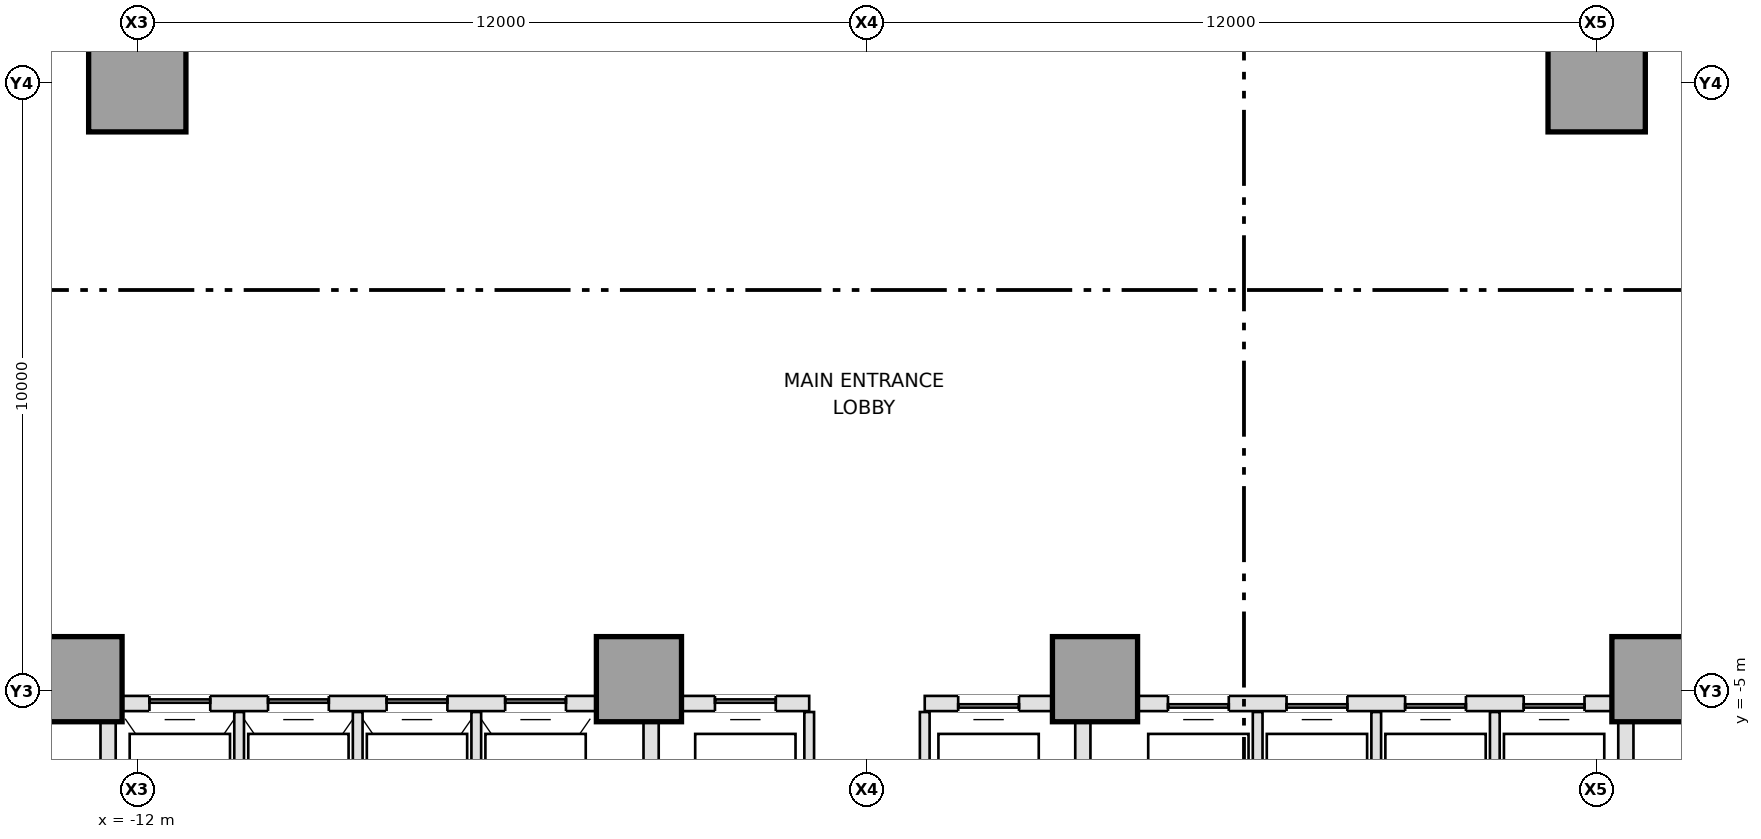
"""IFC4 building model, lengths in metres.
Left out: names, types, materials, properties, quantities, classifications, styles, units other than length and angle.
Written with IfcOpenShell. Run it as: python <this file> out.ifc"""

import sys

from ifc_helpers import new_model, si_unit, direction, frame, frame_2d, origin, origin_2d, place, context, subcontext, project, spatial, rectangle, extrude, element, fill, save


model = new_model("IFC4")
c1 = context("Model", 3, precision=1e-05, world=origin(), true_north=direction((0.0, 1.0)))
c2 = subcontext(c1, "Body", "Model", "MODEL_VIEW")
j1 = project(units=[si_unit("LENGTHUNIT", "METRE"), si_unit("PLANEANGLEUNIT", "RADIAN")], contexts=[c1])
p1 = place(None, origin())
s1 = spatial("IfcSite", under=j1, at=p1, CompositionType="ELEMENT")
p2 = place(p1, origin())
s2 = spatial("IfcBuilding", under=s1, at=p2, CompositionType="ELEMENT")
p3 = place(p2, origin())
s3 = spatial("IfcBuildingStorey", under=s2, at=p3, CompositionType="ELEMENT", Elevation=0.0)
for number, where, z_axis, x_axis in (
    (1, (-12.95, -4.8, 0.0), (0.0, 0.0, 1.0), (1.0, 0.0, 0.0)),
    (2, (-3.75, -4.8, 0.0), (0.0, 0.0, 1.0), (1.0, 0.0, 0.0)),
    (3, (3.75, -4.8, 0.0), (0.0, 0.0, 1.0), (1.0, 0.0, 0.0)),
    (4, (12.95, -4.8, 0.0), (0.0, 0.0, 1.0), (1.0, 0.0, 0.0)),
):
    element("IfcColumn", number, at=place(p3, frame(where, z_axis=z_axis, x_axis=x_axis)), inside=s3, PredefinedType="COLUMN", context=c2, shape_type="SweptSolid", body=[
        extrude(rectangle(XDim=1.4, YDim=1.4, at=origin_2d()), origin(), (0.0, 0.0, 1.0), 5.0),
    ])
for number, where, z_axis, x_axis in (
    (5, (-12.0, 5.0, 0.0), (0.0, 0.0, 1.0), (1.0, 0.0, 0.0)),
    (6, (12.0, 5.0, 0.0), (0.0, 0.0, 1.0), (1.0, 0.0, 0.0)),
):
    element("IfcColumn", number, at=place(p3, frame(where, z_axis=z_axis, x_axis=x_axis)), inside=s3, PredefinedType="COLUMN", context=c2, shape_type="SweptSolid", body=[
        extrude(rectangle(XDim=1.6, YDim=1.6, at=origin_2d()), origin(), (0.0, 0.0, 1.0), 5.0),
    ])
p4 = place(p3, frame((-12.48, -10.18, 0.0), z_axis=(0.0, 0.0, 1.0), x_axis=(0.0, 1.0, 0.0)))
e7 = element("IfcWall", 7, at=p4, inside=s3, PredefinedType="PARTITIONING", context=c2, shape_type="SweptSolid", body=[
    extrude(rectangle(XDim=4.678, YDim=0.25, at=frame_2d((2.339, 0.0))), origin(), (0.0, 0.0, 1.0), 4.7),
])
p5 = place(p4, frame((0.5, 0.0, 0.0)))
e8 = element("IfcOpeningElement", 8, at=p5, cuts=e7, PredefinedType="OPENING", context=c2, shape_type="SweptSolid", body=[
    extrude(rectangle(XDim=1.05, YDim=2.15, at=frame_2d((0.525, 1.075))), frame((0.0, 0.135, 0.0), z_axis=(0.0, -1.0, 0.0), x_axis=(1.0, 0.0, 0.0)), (0.0, 0.0, 1.0), 0.27),
])
p6 = place(p3, frame((12.48, -5.502, 0.0), z_axis=(0.0, 0.0, 1.0), x_axis=(0.0, -1.0, 0.0)))
e9 = element("IfcWall", 9, at=p6, inside=s3, PredefinedType="PARTITIONING", context=c2, shape_type="SweptSolid", body=[
    extrude(rectangle(XDim=4.678, YDim=0.25, at=frame_2d((2.339, 0.0))), origin(), (0.0, 0.0, 1.0), 4.7),
])
p7 = place(p6, frame((3.29, 0.0, 0.0)))
e10 = element("IfcOpeningElement", 10, at=p7, cuts=e9, PredefinedType="OPENING", context=c2, shape_type="SweptSolid", body=[
    extrude(rectangle(XDim=1.05, YDim=2.15, at=frame_2d((0.525, 1.075))), frame((0.0, 0.135, 0.0), z_axis=(0.0, -1.0, 0.0), x_axis=(1.0, 0.0, 0.0)), (0.0, 0.0, 1.0), 0.27),
])
p8 = place(p3, frame((-3.55, -15.648, 0.0), z_axis=(0.0, 0.0, 1.0), x_axis=(0.0, 1.0, 0.0)))
e11 = element("IfcWall", 11, at=p8, inside=s3, PredefinedType="PARTITIONING", context=c2, shape_type="SweptSolid", body=[
    extrude(rectangle(XDim=10.146, YDim=0.25, at=frame_2d((5.073, 0.0))), origin(), (0.0, 0.0, 1.0), 4.7),
])
p9 = place(p8, frame((5.948, 0.0, 0.0)))
e12 = element("IfcOpeningElement", 12, at=p9, cuts=e11, PredefinedType="OPENING", context=c2, shape_type="SweptSolid", body=[
    extrude(rectangle(XDim=1.0, YDim=2.15, at=frame_2d((0.5, 1.075))), frame((0.0, 0.135, 0.0), z_axis=(0.0, -1.0, 0.0), x_axis=(1.0, 0.0, 0.0)), (0.0, 0.0, 1.0), 0.27),
])
p10 = place(p3, frame((3.55, -15.648, 0.0), z_axis=(0.0, 0.0, 1.0), x_axis=(0.0, 1.0, 0.0)))
e13 = element("IfcWall", 13, at=p10, inside=s3, PredefinedType="PARTITIONING", context=c2, shape_type="SweptSolid", body=[
    extrude(rectangle(XDim=10.146, YDim=0.25, at=frame_2d((5.073, 0.0))), origin(), (0.0, 0.0, 1.0), 4.7),
])
p11 = place(p10, frame((5.948, 0.0, 0.0)))
e14 = element("IfcOpeningElement", 14, at=p11, cuts=e13, PredefinedType="OPENING", context=c2, shape_type="SweptSolid", body=[
    extrude(rectangle(XDim=1.0, YDim=2.15, at=frame_2d((0.5, 1.075))), frame((0.0, 0.135, 0.0), z_axis=(0.0, -1.0, 0.0), x_axis=(1.0, 0.0, 0.0)), (0.0, 0.0, 1.0), 0.27),
])
p12 = place(p3, frame((-12.248, -5.2, 0.0), z_axis=(0.0, 0.0, 1.0), x_axis=(1.0, 0.0, 0.0)))
e15 = element("IfcWall", 15, at=p12, inside=s3, PredefinedType="PARTITIONING", context=c2, shape_type="SweptSolid", body=[
    extrude(rectangle(XDim=7.796, YDim=0.25, at=frame_2d((3.898, 0.0))), origin(), (0.0, 0.0, 1.0), 4.7),
])
p13 = place(p12, frame((0.448, 0.0, 0.0)))
e16 = element("IfcOpeningElement", 16, at=p13, cuts=e15, PredefinedType="OPENING", context=c2, shape_type="SweptSolid", body=[
    extrude(rectangle(XDim=1.0, YDim=2.15, at=frame_2d((0.5, 1.075))), frame((0.0, 0.135, 0.0), z_axis=(0.0, -1.0, 0.0), x_axis=(1.0, 0.0, 0.0)), (0.0, 0.0, 1.0), 0.27),
])
p14 = place(p12, frame((2.398, 0.0, 0.0)))
e17 = element("IfcOpeningElement", 17, at=p14, cuts=e15, PredefinedType="OPENING", context=c2, shape_type="SweptSolid", body=[
    extrude(rectangle(XDim=1.0, YDim=2.15, at=frame_2d((0.5, 1.075))), frame((0.0, 0.135, 0.0), z_axis=(0.0, -1.0, 0.0), x_axis=(1.0, 0.0, 0.0)), (0.0, 0.0, 1.0), 0.27),
])
p15 = place(p12, frame((4.348, 0.0, 0.0)))
e18 = element("IfcOpeningElement", 18, at=p15, cuts=e15, PredefinedType="OPENING", context=c2, shape_type="SweptSolid", body=[
    extrude(rectangle(XDim=1.0, YDim=2.15, at=frame_2d((0.5, 1.075))), frame((0.0, 0.135, 0.0), z_axis=(0.0, -1.0, 0.0), x_axis=(1.0, 0.0, 0.0)), (0.0, 0.0, 1.0), 0.27),
])
p16 = place(p12, frame((6.298, 0.0, 0.0)))
e19 = element("IfcOpeningElement", 19, at=p16, cuts=e15, PredefinedType="OPENING", context=c2, shape_type="SweptSolid", body=[
    extrude(rectangle(XDim=1.0, YDim=2.15, at=frame_2d((0.5, 1.075))), frame((0.0, 0.135, 0.0), z_axis=(0.0, -1.0, 0.0), x_axis=(1.0, 0.0, 0.0)), (0.0, 0.0, 1.0), 0.27),
])
p17 = place(p3, frame((4.452, -5.2, 0.0), z_axis=(0.0, 0.0, 1.0), x_axis=(1.0, 0.0, 0.0)))
e20 = element("IfcWall", 20, at=p17, inside=s3, PredefinedType="PARTITIONING", context=c2, shape_type="SweptSolid", body=[
    extrude(rectangle(XDim=7.796, YDim=0.25, at=frame_2d((3.898, 0.0))), origin(), (0.0, 0.0, 1.0), 4.7),
])
p18 = place(p17, frame((0.498, 0.0, 0.0)))
e21 = element("IfcOpeningElement", 21, at=p18, cuts=e20, PredefinedType="OPENING", context=c2, shape_type="SweptSolid", body=[
    extrude(rectangle(XDim=1.0, YDim=2.15, at=frame_2d((0.5, 1.075))), frame((0.0, 0.135, 0.0), z_axis=(0.0, -1.0, 0.0), x_axis=(1.0, 0.0, 0.0)), (0.0, 0.0, 1.0), 0.27),
])
p19 = place(p17, frame((2.448, 0.0, 0.0)))
e22 = element("IfcOpeningElement", 22, at=p19, cuts=e20, PredefinedType="OPENING", context=c2, shape_type="SweptSolid", body=[
    extrude(rectangle(XDim=1.0, YDim=2.15, at=frame_2d((0.5, 1.075))), frame((0.0, 0.135, 0.0), z_axis=(0.0, -1.0, 0.0), x_axis=(1.0, 0.0, 0.0)), (0.0, 0.0, 1.0), 0.27),
])
p20 = place(p17, frame((4.398, 0.0, 0.0)))
e23 = element("IfcOpeningElement", 23, at=p20, cuts=e20, PredefinedType="OPENING", context=c2, shape_type="SweptSolid", body=[
    extrude(rectangle(XDim=1.0, YDim=2.15, at=frame_2d((0.5, 1.075))), frame((0.0, 0.135, 0.0), z_axis=(0.0, -1.0, 0.0), x_axis=(1.0, 0.0, 0.0)), (0.0, 0.0, 1.0), 0.27),
])
p21 = place(p17, frame((6.348, 0.0, 0.0)))
e24 = element("IfcOpeningElement", 24, at=p21, cuts=e20, PredefinedType="OPENING", context=c2, shape_type="SweptSolid", body=[
    extrude(rectangle(XDim=1.0, YDim=2.15, at=frame_2d((0.5, 1.075))), frame((0.0, 0.135, 0.0), z_axis=(0.0, -1.0, 0.0), x_axis=(1.0, 0.0, 0.0)), (0.0, 0.0, 1.0), 0.27),
])
p22 = place(p3, frame((-3.048, -5.2, 0.0), z_axis=(0.0, 0.0, 1.0), x_axis=(1.0, 0.0, 0.0)))
e25 = element("IfcWall", 25, at=p22, inside=s3, PredefinedType="PARTITIONING", context=c2, shape_type="SweptSolid", body=[
    extrude(rectangle(XDim=2.098, YDim=0.25, at=frame_2d((1.049, 0.0))), origin(), (0.0, 0.0, 1.0), 4.7),
])
p23 = place(p22, frame((0.548, 0.0, 0.0)))
e26 = element("IfcOpeningElement", 26, at=p23, cuts=e25, PredefinedType="OPENING", context=c2, shape_type="SweptSolid", body=[
    extrude(rectangle(XDim=1.0, YDim=2.15, at=frame_2d((0.5, 1.075))), frame((0.0, 0.135, 0.0), z_axis=(0.0, -1.0, 0.0), x_axis=(1.0, 0.0, 0.0)), (0.0, 0.0, 1.0), 0.27),
])
p24 = place(p3, frame((0.95, -5.2, 0.0), z_axis=(0.0, 0.0, 1.0), x_axis=(1.0, 0.0, 0.0)))
e27 = element("IfcWall", 27, at=p24, inside=s3, PredefinedType="PARTITIONING", context=c2, shape_type="SweptSolid", body=[
    extrude(rectangle(XDim=2.098, YDim=0.25, at=frame_2d((1.049, 0.0))), origin(), (0.0, 0.0, 1.0), 4.7),
])
p25 = place(p24, frame((0.55, 0.0, 0.0)))
e28 = element("IfcOpeningElement", 28, at=p25, cuts=e27, PredefinedType="OPENING", context=c2, shape_type="SweptSolid", body=[
    extrude(rectangle(XDim=1.0, YDim=2.15, at=frame_2d((0.5, 1.075))), frame((0.0, 0.135, 0.0), z_axis=(0.0, -1.0, 0.0), x_axis=(1.0, 0.0, 0.0)), (0.0, 0.0, 1.0), 0.27),
])
p26 = place(p3, frame((-10.325, -7.993, 0.0), z_axis=(0.0, 0.0, 1.0), x_axis=(0.0, 1.0, 0.0)))
e29 = element("IfcWall", 29, at=p26, inside=s3, PredefinedType="PARTITIONING", context=c2, shape_type="SweptSolid", body=[
    extrude(rectangle(XDim=2.653, YDim=0.16, at=frame_2d((1.326, 0.0))), origin(), (0.0, 0.0, 1.0), 4.7),
])
for number, where, z_axis, x_axis in (
    (30, (-8.375, -8.073, 0.0), (0.0, 0.0, 1.0), (0.0, 1.0, 0.0)),
    (31, (-6.425, -8.073, 0.0), (0.0, 0.0, 1.0), (0.0, 1.0, 0.0)),
    (32, (6.425, -8.073, 0.0), (0.0, 0.0, 1.0), (0.0, 1.0, 0.0)),
    (33, (8.375, -8.073, 0.0), (0.0, 0.0, 1.0), (0.0, 1.0, 0.0)),
):
    element("IfcWall", number, at=place(p3, frame(where, z_axis=z_axis, x_axis=x_axis)), inside=s3, PredefinedType="PARTITIONING", context=c2, shape_type="SweptSolid", body=[
        extrude(rectangle(XDim=2.733, YDim=0.16, at=frame_2d((1.366, 0.0))), origin(), (0.0, 0.0, 1.0), 4.7),
    ])
p27 = place(p3, frame((10.325, -7.993, 0.0), z_axis=(0.0, 0.0, 1.0), x_axis=(0.0, 1.0, 0.0)))
e34 = element("IfcWall", 34, at=p27, inside=s3, PredefinedType="PARTITIONING", context=c2, shape_type="SweptSolid", body=[
    extrude(rectangle(XDim=2.653, YDim=0.16, at=frame_2d((1.326, 0.0))), origin(), (0.0, 0.0, 1.0), 4.7),
])
for number, where, z_axis, x_axis in (
    (35, (-0.95, -8.12, 0.0), (0.0, 0.0, 1.0), (0.0, 1.0, 0.0)),
    (36, (0.95, -8.12, 0.0), (0.0, 0.0, 1.0), (0.0, 1.0, 0.0)),
):
    element("IfcWall", number, at=place(p3, frame(where, z_axis=z_axis, x_axis=x_axis)), inside=s3, PredefinedType="PARTITIONING", context=c2, shape_type="SweptSolid", body=[
        extrude(rectangle(XDim=2.78, YDim=0.16, at=frame_2d((1.39, 0.0))), origin(), (0.0, 0.0, 1.0), 4.7),
    ])
p28 = place(p13, origin())
e37 = element("IfcDoor", 37, at=p28, inside=s3, OperationType="SLIDING_TO_LEFT", PredefinedType="DOOR", context=c2, shape_type="SweptSolid", body=[
    extrude(rectangle(XDim=1.0, YDim=2.15, at=frame_2d((0.5, 1.075))), frame((0.0, 0.025, 0.0), z_axis=(0.0, -1.0, 0.0), x_axis=(1.0, 0.0, 0.0)), (0.0, 0.0, 1.0), 0.05),
])
fill(e16, e37)
p29 = place(p14, origin())
e38 = element("IfcDoor", 38, at=p29, inside=s3, OperationType="SLIDING_TO_LEFT", PredefinedType="DOOR", context=c2, shape_type="SweptSolid", body=[
    extrude(rectangle(XDim=1.0, YDim=2.15, at=frame_2d((0.5, 1.075))), frame((0.0, 0.025, 0.0), z_axis=(0.0, -1.0, 0.0), x_axis=(1.0, 0.0, 0.0)), (0.0, 0.0, 1.0), 0.05),
])
fill(e17, e38)
p30 = place(p15, origin())
e39 = element("IfcDoor", 39, at=p30, inside=s3, OperationType="SLIDING_TO_LEFT", PredefinedType="DOOR", context=c2, shape_type="SweptSolid", body=[
    extrude(rectangle(XDim=1.0, YDim=2.15, at=frame_2d((0.5, 1.075))), frame((0.0, 0.025, 0.0), z_axis=(0.0, -1.0, 0.0), x_axis=(1.0, 0.0, 0.0)), (0.0, 0.0, 1.0), 0.05),
])
fill(e18, e39)
p31 = place(p16, origin())
e40 = element("IfcDoor", 40, at=p31, inside=s3, OperationType="SLIDING_TO_LEFT", PredefinedType="DOOR", context=c2, shape_type="SweptSolid", body=[
    extrude(rectangle(XDim=1.0, YDim=2.15, at=frame_2d((0.5, 1.075))), frame((0.0, 0.025, 0.0), z_axis=(0.0, -1.0, 0.0), x_axis=(1.0, 0.0, 0.0)), (0.0, 0.0, 1.0), 0.05),
])
fill(e19, e40)
p32 = place(p23, origin())
e41 = element("IfcDoor", 41, at=p32, inside=s3, OperationType="SLIDING_TO_LEFT", PredefinedType="DOOR", context=c2, shape_type="SweptSolid", body=[
    extrude(rectangle(XDim=1.0, YDim=2.15, at=frame_2d((0.5, 1.075))), frame((0.0, 0.025, 0.0), z_axis=(0.0, -1.0, 0.0), x_axis=(1.0, 0.0, 0.0)), (0.0, 0.0, 1.0), 0.05),
])
fill(e26, e41)
p33 = place(p25, origin())
e42 = element("IfcDoor", 42, at=p33, inside=s3, OperationType="SLIDING_TO_RIGHT", PredefinedType="DOOR", context=c2, shape_type="SweptSolid", body=[
    extrude(rectangle(XDim=1.0, YDim=2.15, at=frame_2d((0.5, 1.075))), frame((0.0, 0.025, 0.0), z_axis=(0.0, -1.0, 0.0), x_axis=(1.0, 0.0, 0.0)), (0.0, 0.0, 1.0), 0.05),
])
fill(e28, e42)
p34 = place(p18, origin())
e43 = element("IfcDoor", 43, at=p34, inside=s3, OperationType="SLIDING_TO_RIGHT", PredefinedType="DOOR", context=c2, shape_type="SweptSolid", body=[
    extrude(rectangle(XDim=1.0, YDim=2.15, at=frame_2d((0.5, 1.075))), frame((0.0, 0.025, 0.0), z_axis=(0.0, -1.0, 0.0), x_axis=(1.0, 0.0, 0.0)), (0.0, 0.0, 1.0), 0.05),
])
fill(e21, e43)
p35 = place(p19, origin())
e44 = element("IfcDoor", 44, at=p35, inside=s3, OperationType="SLIDING_TO_RIGHT", PredefinedType="DOOR", context=c2, shape_type="SweptSolid", body=[
    extrude(rectangle(XDim=1.0, YDim=2.15, at=frame_2d((0.5, 1.075))), frame((0.0, 0.025, 0.0), z_axis=(0.0, -1.0, 0.0), x_axis=(1.0, 0.0, 0.0)), (0.0, 0.0, 1.0), 0.05),
])
fill(e22, e44)
p36 = place(p20, origin())
e45 = element("IfcDoor", 45, at=p36, inside=s3, OperationType="SLIDING_TO_RIGHT", PredefinedType="DOOR", context=c2, shape_type="SweptSolid", body=[
    extrude(rectangle(XDim=1.0, YDim=2.15, at=frame_2d((0.5, 1.075))), frame((0.0, 0.025, 0.0), z_axis=(0.0, -1.0, 0.0), x_axis=(1.0, 0.0, 0.0)), (0.0, 0.0, 1.0), 0.05),
])
fill(e23, e45)
p37 = place(p21, origin())
e46 = element("IfcDoor", 46, at=p37, inside=s3, OperationType="SLIDING_TO_RIGHT", PredefinedType="DOOR", context=c2, shape_type="SweptSolid", body=[
    extrude(rectangle(XDim=1.0, YDim=2.15, at=frame_2d((0.5, 1.075))), frame((0.0, 0.025, 0.0), z_axis=(0.0, -1.0, 0.0), x_axis=(1.0, 0.0, 0.0)), (0.0, 0.0, 1.0), 0.05),
])
fill(e24, e46)
save(model, sys.argv[1])
